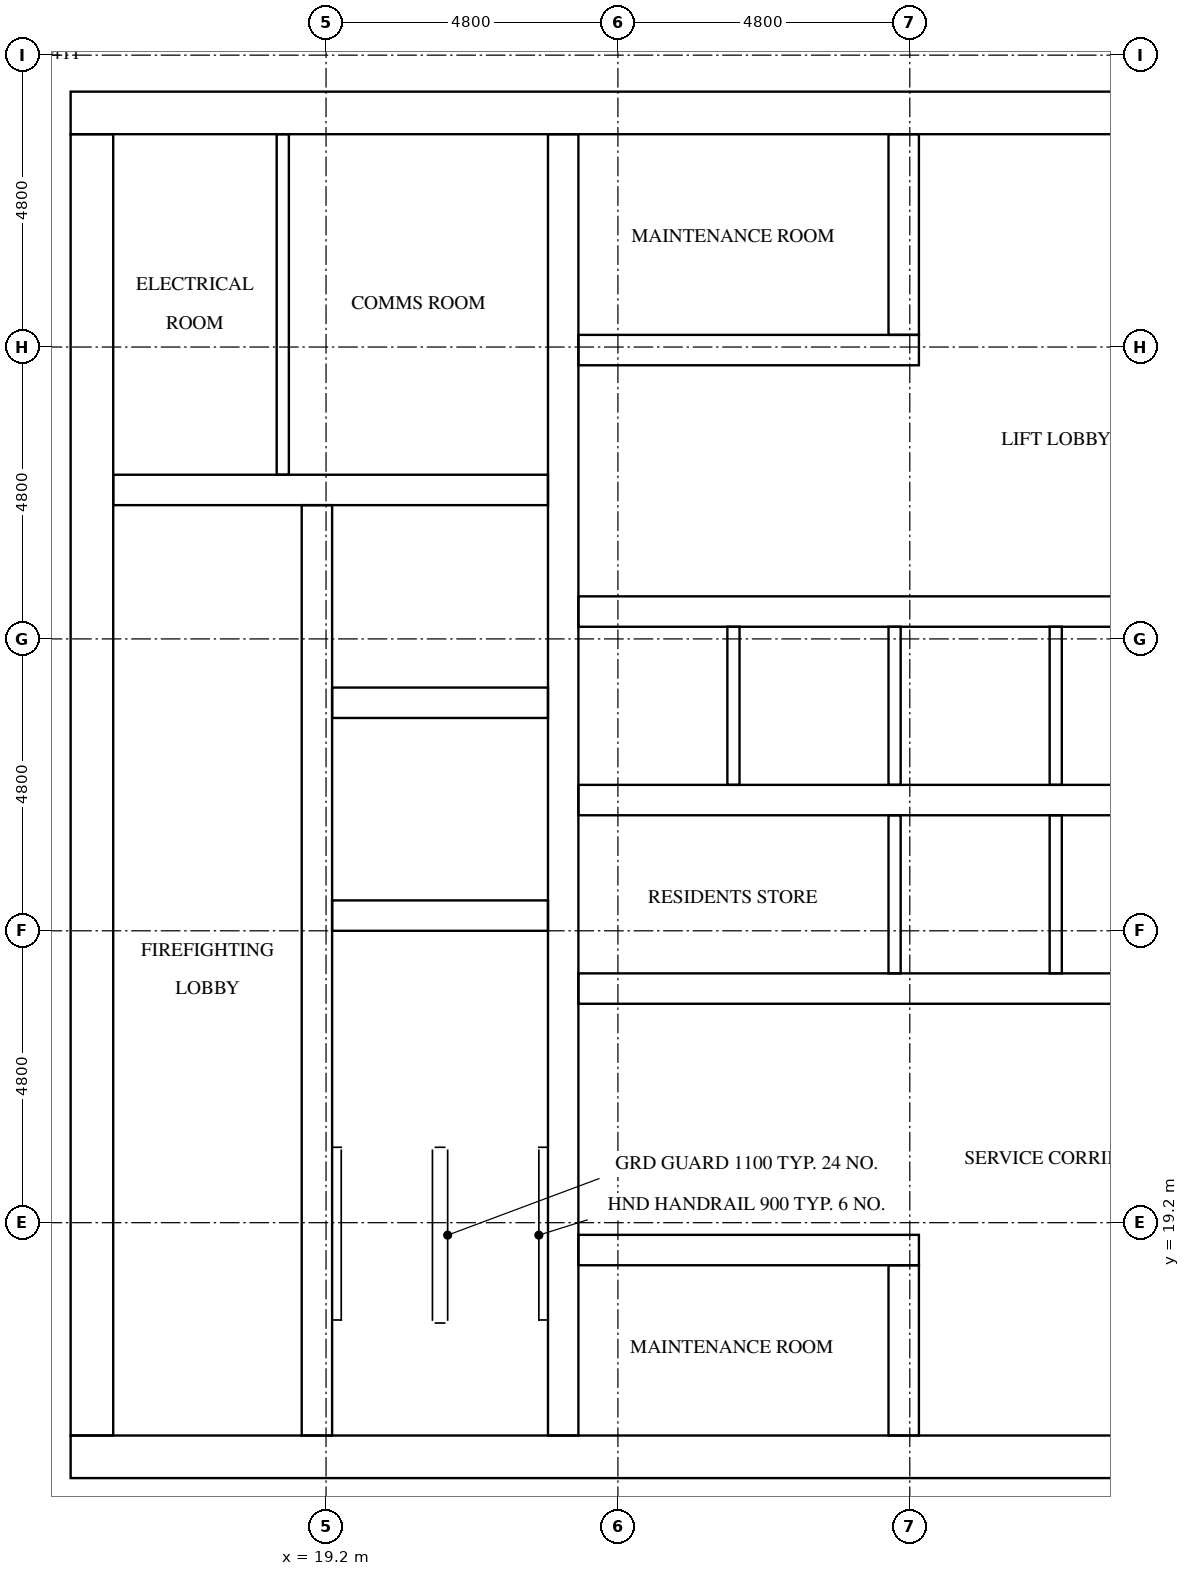
"""IFC4 building model, lengths in metres.
Left out: names, types, materials, properties, quantities, classifications, styles, units other than length and angle.
Written with IfcOpenShell. Run it as: python <this file> out.ifc"""

import sys

from ifc_helpers import new_model, si_unit, direction, frame, frame_2d, origin, place, context, subcontext, project, spatial, rectangle, extrude, element, fill, save


model = new_model("IFC4")
c1 = context("Model", 3, precision=1e-05, world=origin(), true_north=direction((0.0, 1.0)))
c2 = subcontext(c1, "Body", "Model", "MODEL_VIEW")
j1 = project(units=[si_unit("LENGTHUNIT", "METRE"), si_unit("PLANEANGLEUNIT", "RADIAN")], contexts=[c1])
p1 = place(None, origin())
s1 = spatial("IfcSite", under=j1, at=p1, CompositionType="ELEMENT")
p2 = place(p1, origin())
s2 = spatial("IfcBuilding", under=s1, at=p2, CompositionType="ELEMENT")
p3 = place(p2, frame((0.0, 0.0, 208.8)))
s3 = spatial("IfcBuildingStorey", under=s2, at=p3, CompositionType="ELEMENT", Elevation=208.8)
p4 = place(p3, frame((15.0, 15.35, 0.0), z_axis=(0.0, 0.0, 1.0), x_axis=(1.0, 0.0, 0.0)))
e1 = element("IfcWall", 1, at=p4, inside=s3, PredefinedType="SHEAR", context=c2, shape_type="SweptSolid", body=[
    extrude(rectangle(XDim=32.4, YDim=0.7, at=frame_2d((16.2, 0.0))), origin(), (0.0, 0.0, 1.0), 3.2),
])
p5 = place(p4, frame((15.3, 0.0, 0.0)))
e2 = element("IfcOpeningElement", 2, at=p5, cuts=e1, PredefinedType="OPENING", context=c2, shape_type="SweptSolid", body=[
    extrude(rectangle(XDim=1.8, YDim=2.1, at=frame_2d((0.9, 1.05))), frame((0.0, 0.36, 0.0), z_axis=(0.0, -1.0, 0.0), x_axis=(1.0, 0.0, 0.0)), (0.0, 0.0, 1.0), 0.72),
])
p6 = place(p3, frame((15.0, 37.45, 0.0), z_axis=(0.0, 0.0, 1.0), x_axis=(1.0, 0.0, 0.0)))
e3 = element("IfcWall", 3, at=p6, inside=s3, PredefinedType="SHEAR", context=c2, shape_type="SweptSolid", body=[
    extrude(rectangle(XDim=32.4, YDim=0.7, at=frame_2d((16.2, 0.0))), origin(), (0.0, 0.0, 1.0), 3.2),
])
p7 = place(p6, frame((15.3, 0.0, 0.0)))
e4 = element("IfcOpeningElement", 4, at=p7, cuts=e3, PredefinedType="OPENING", context=c2, shape_type="SweptSolid", body=[
    extrude(rectangle(XDim=1.8, YDim=2.1, at=frame_2d((0.9, 1.05))), frame((0.0, 0.36, 0.0), z_axis=(0.0, -1.0, 0.0), x_axis=(1.0, 0.0, 0.0)), (0.0, 0.0, 1.0), 0.72),
])
p8 = place(p6, frame((1.544, 0.0, 0.0)))
e5 = element("IfcOpeningElement", 5, at=p8, cuts=e3, PredefinedType="OPENING", context=c2, shape_type="SweptSolid", body=[
    extrude(rectangle(XDim=1.0, YDim=2.1, at=frame_2d((0.5, 1.05))), frame((0.0, 0.36, 0.0), z_axis=(0.0, -1.0, 0.0), x_axis=(1.0, 0.0, 0.0)), (0.0, 0.0, 1.0), 0.72),
])
p9 = place(p6, frame((5.219, 0.0, 0.0)))
e6 = element("IfcOpeningElement", 6, at=p9, cuts=e3, PredefinedType="OPENING", context=c2, shape_type="SweptSolid", body=[
    extrude(rectangle(XDim=1.0, YDim=2.1, at=frame_2d((0.5, 1.05))), frame((0.0, 0.36, 0.0), z_axis=(0.0, -1.0, 0.0), x_axis=(1.0, 0.0, 0.0)), (0.0, 0.0, 1.0), 0.72),
])
p10 = place(p3, frame((15.35, 15.7, 0.0), z_axis=(0.0, 0.0, 1.0), x_axis=(0.0, 1.0, 0.0)))
e7 = element("IfcWall", 7, at=p10, inside=s3, PredefinedType="SHEAR", context=c2, shape_type="SweptSolid", body=[
    extrude(rectangle(XDim=21.4, YDim=0.7, at=frame_2d((10.7, 0.0))), origin(), (0.0, 0.0, 1.0), 3.2),
])
p11 = place(p10, frame((5.06, 0.0, 0.0)))
e8 = element("IfcOpeningElement", 8, at=p11, cuts=e7, PredefinedType="OPENING", context=c2, shape_type="SweptSolid", body=[
    extrude(rectangle(XDim=1.2, YDim=2.1, at=frame_2d((0.6, 1.05))), frame((0.0, 0.36, 0.0), z_axis=(0.0, -1.0, 0.0), x_axis=(1.0, 0.0, 0.0)), (0.0, 0.0, 1.0), 0.72),
])
p12 = place(p3, frame((19.05, 15.7, 0.0), z_axis=(0.0, 0.0, 1.0), x_axis=(0.0, 1.0, 0.0)))
e9 = element("IfcWall", 9, at=p12, inside=s3, PredefinedType="SHEAR", context=c2, shape_type="SweptSolid", body=[
    extrude(rectangle(XDim=15.3, YDim=0.5, at=frame_2d((7.65, 0.0))), origin(), (0.0, 0.0, 1.0), 3.2),
])
p13 = place(p12, frame((9.75, 0.0, 0.0)))
e10 = element("IfcOpeningElement", 10, at=p13, cuts=e9, PredefinedType="OPENING", context=c2, shape_type="SweptSolid", body=[
    extrude(rectangle(XDim=1.1, YDim=2.1, at=frame_2d((0.55, 1.05))), frame((0.0, 0.26, 0.0), z_axis=(0.0, -1.0, 0.0), x_axis=(1.0, 0.0, 0.0)), (0.0, 0.0, 1.0), 0.52),
])
p14 = place(p12, frame((13.25, 0.0, 0.0)))
e11 = element("IfcOpeningElement", 11, at=p14, cuts=e9, PredefinedType="OPENING", context=c2, shape_type="SweptSolid", body=[
    extrude(rectangle(XDim=1.1, YDim=2.1, at=frame_2d((0.55, 1.05))), frame((0.0, 0.26, 0.0), z_axis=(0.0, -1.0, 0.0), x_axis=(1.0, 0.0, 0.0)), (0.0, 0.0, 1.0), 0.52),
])
p15 = place(p12, frame((0.5, 0.0, 0.0)))
e12 = element("IfcOpeningElement", 12, at=p15, cuts=e9, PredefinedType="OPENING", context=c2, shape_type="SweptSolid", body=[
    extrude(rectangle(XDim=1.2, YDim=2.1, at=frame_2d((0.6, 1.05))), frame((0.0, 0.26, 0.0), z_axis=(0.0, -1.0, 0.0), x_axis=(1.0, 0.0, 0.0)), (0.0, 0.0, 1.0), 0.52),
])
p16 = place(p3, frame((23.1, 15.7, 0.0), z_axis=(0.0, 0.0, 1.0), x_axis=(0.0, 1.0, 0.0)))
e13 = element("IfcWall", 13, at=p16, inside=s3, PredefinedType="SHEAR", context=c2, shape_type="SweptSolid", body=[
    extrude(rectangle(XDim=21.4, YDim=0.5, at=frame_2d((10.7, 0.0))), origin(), (0.0, 0.0, 1.0), 3.2),
])
for number, where, z_axis, x_axis in (
    (14, (19.3, 24.25, 0.0), (0.0, 0.0, 1.0), (1.0, 0.0, 0.0)),
    (15, (19.3, 27.75, 0.0), (0.0, 0.0, 1.0), (1.0, 0.0, 0.0)),
):
    element("IfcWall", number, at=place(p3, frame(where, z_axis=z_axis, x_axis=x_axis)), inside=s3, PredefinedType="SHEAR", context=c2, shape_type="SweptSolid", body=[
        extrude(rectangle(XDim=3.55, YDim=0.5, at=frame_2d((1.775, 0.0))), origin(), (0.0, 0.0, 1.0), 3.2),
    ])
p17 = place(p3, frame((15.7, 31.25, 0.0), z_axis=(0.0, 0.0, 1.0), x_axis=(1.0, 0.0, 0.0)))
e16 = element("IfcWall", 16, at=p17, inside=s3, PredefinedType="SHEAR", context=c2, shape_type="SweptSolid", body=[
    extrude(rectangle(XDim=7.15, YDim=0.5, at=frame_2d((3.575, 0.0))), origin(), (0.0, 0.0, 1.0), 3.2),
])
p18 = place(p3, frame((23.35, 18.75, 0.0), z_axis=(0.0, 0.0, 1.0), x_axis=(1.0, 0.0, 0.0)))
e17 = element("IfcWall", 17, at=p18, inside=s3, PredefinedType="SHEAR", context=c2, shape_type="SweptSolid", body=[
    extrude(rectangle(XDim=5.6, YDim=0.5, at=frame_2d((2.8, 0.0))), origin(), (0.0, 0.0, 1.0), 3.2),
])
p19 = place(p18, frame((2.05, 0.0, 0.0)))
e18 = element("IfcOpeningElement", 18, at=p19, cuts=e17, PredefinedType="OPENING", context=c2, shape_type="SweptSolid", body=[
    extrude(rectangle(XDim=1.0, YDim=2.1, at=frame_2d((0.5, 1.05))), frame((0.0, 0.26, 0.0), z_axis=(0.0, -1.0, 0.0), x_axis=(1.0, 0.0, 0.0)), (0.0, 0.0, 1.0), 0.52),
])
p20 = place(p3, frame((23.35, 23.05, 0.0), z_axis=(0.0, 0.0, 1.0), x_axis=(1.0, 0.0, 0.0)))
e19 = element("IfcWall", 19, at=p20, inside=s3, PredefinedType="SHEAR", context=c2, shape_type="SweptSolid", body=[
    extrude(rectangle(XDim=15.7, YDim=0.5, at=frame_2d((7.85, 0.0))), origin(), (0.0, 0.0, 1.0), 3.2),
])
p21 = place(p20, frame((2.05, 0.0, 0.0)))
e20 = element("IfcOpeningElement", 20, at=p21, cuts=e19, PredefinedType="OPENING", context=c2, shape_type="SweptSolid", body=[
    extrude(rectangle(XDim=1.0, YDim=2.1, at=frame_2d((0.5, 1.05))), frame((0.0, 0.26, 0.0), z_axis=(0.0, -1.0, 0.0), x_axis=(1.0, 0.0, 0.0)), (0.0, 0.0, 1.0), 0.52),
])
p22 = place(p20, frame((12.65, 0.0, 0.0)))
e21 = element("IfcOpeningElement", 21, at=p22, cuts=e19, PredefinedType="OPENING", context=c2, shape_type="SweptSolid", body=[
    extrude(rectangle(XDim=1.0, YDim=2.1, at=frame_2d((0.5, 1.05))), frame((0.0, 0.26, 0.0), z_axis=(0.0, -1.0, 0.0), x_axis=(1.0, 0.0, 0.0)), (0.0, 0.0, 1.0), 0.52),
])
p23 = place(p3, frame((23.35, 26.15, 0.0), z_axis=(0.0, 0.0, 1.0), x_axis=(1.0, 0.0, 0.0)))
e22 = element("IfcWall", 22, at=p23, inside=s3, PredefinedType="SHEAR", context=c2, shape_type="SweptSolid", body=[
    extrude(rectangle(XDim=15.7, YDim=0.5, at=frame_2d((7.85, 0.0))), origin(), (0.0, 0.0, 1.0), 3.2),
])
p24 = place(p3, frame((23.35, 29.25, 0.0), z_axis=(0.0, 0.0, 1.0), x_axis=(1.0, 0.0, 0.0)))
e23 = element("IfcWall", 23, at=p24, inside=s3, PredefinedType="SHEAR", context=c2, shape_type="SweptSolid", body=[
    extrude(rectangle(XDim=15.7, YDim=0.5, at=frame_2d((7.85, 0.0))), origin(), (0.0, 0.0, 1.0), 3.2),
])
p25 = place(p24, frame((0.675, 0.0, 0.0)))
e24 = element("IfcOpeningElement", 24, at=p25, cuts=e23, PredefinedType="OPENING", context=c2, shape_type="SweptSolid", body=[
    extrude(rectangle(XDim=1.1, YDim=2.1, at=frame_2d((0.55, 1.05))), frame((0.0, 0.26, 0.0), z_axis=(0.0, -1.0, 0.0), x_axis=(1.0, 0.0, 0.0)), (0.0, 0.0, 1.0), 0.52),
])
p26 = place(p24, frame((3.325, 0.0, 0.0)))
e25 = element("IfcOpeningElement", 25, at=p26, cuts=e23, PredefinedType="OPENING", context=c2, shape_type="SweptSolid", body=[
    extrude(rectangle(XDim=1.1, YDim=2.1, at=frame_2d((0.55, 1.05))), frame((0.0, 0.26, 0.0), z_axis=(0.0, -1.0, 0.0), x_axis=(1.0, 0.0, 0.0)), (0.0, 0.0, 1.0), 0.52),
])
p27 = place(p24, frame((5.975, 0.0, 0.0)))
e26 = element("IfcOpeningElement", 26, at=p27, cuts=e23, PredefinedType="OPENING", context=c2, shape_type="SweptSolid", body=[
    extrude(rectangle(XDim=1.1, YDim=2.1, at=frame_2d((0.55, 1.05))), frame((0.0, 0.26, 0.0), z_axis=(0.0, -1.0, 0.0), x_axis=(1.0, 0.0, 0.0)), (0.0, 0.0, 1.0), 0.52),
])
p28 = place(p24, frame((8.625, 0.0, 0.0)))
e27 = element("IfcOpeningElement", 27, at=p28, cuts=e23, PredefinedType="OPENING", context=c2, shape_type="SweptSolid", body=[
    extrude(rectangle(XDim=1.1, YDim=2.1, at=frame_2d((0.55, 1.05))), frame((0.0, 0.26, 0.0), z_axis=(0.0, -1.0, 0.0), x_axis=(1.0, 0.0, 0.0)), (0.0, 0.0, 1.0), 0.52),
])
p29 = place(p24, frame((11.275, 0.0, 0.0)))
e28 = element("IfcOpeningElement", 28, at=p29, cuts=e23, PredefinedType="OPENING", context=c2, shape_type="SweptSolid", body=[
    extrude(rectangle(XDim=1.1, YDim=2.1, at=frame_2d((0.55, 1.05))), frame((0.0, 0.26, 0.0), z_axis=(0.0, -1.0, 0.0), x_axis=(1.0, 0.0, 0.0)), (0.0, 0.0, 1.0), 0.52),
])
p30 = place(p24, frame((13.925, 0.0, 0.0)))
e29 = element("IfcOpeningElement", 29, at=p30, cuts=e23, PredefinedType="OPENING", context=c2, shape_type="SweptSolid", body=[
    extrude(rectangle(XDim=1.1, YDim=2.1, at=frame_2d((0.55, 1.05))), frame((0.0, 0.26, 0.0), z_axis=(0.0, -1.0, 0.0), x_axis=(1.0, 0.0, 0.0)), (0.0, 0.0, 1.0), 0.52),
])
p31 = place(p3, frame((23.35, 33.55, 0.0), z_axis=(0.0, 0.0, 1.0), x_axis=(1.0, 0.0, 0.0)))
e30 = element("IfcWall", 30, at=p31, inside=s3, PredefinedType="SHEAR", context=c2, shape_type="SweptSolid", body=[
    extrude(rectangle(XDim=5.6, YDim=0.5, at=frame_2d((2.8, 0.0))), origin(), (0.0, 0.0, 1.0), 3.2),
])
p32 = place(p31, frame((2.05, 0.0, 0.0)))
e31 = element("IfcOpeningElement", 31, at=p32, cuts=e30, PredefinedType="OPENING", context=c2, shape_type="SweptSolid", body=[
    extrude(rectangle(XDim=1.0, YDim=2.1, at=frame_2d((0.5, 1.05))), frame((0.0, 0.26, 0.0), z_axis=(0.0, -1.0, 0.0), x_axis=(1.0, 0.0, 0.0)), (0.0, 0.0, 1.0), 0.52),
])
p33 = place(p3, frame((28.7, 15.7, 0.0), z_axis=(0.0, 0.0, 1.0), x_axis=(0.0, 1.0, 0.0)))
e32 = element("IfcWall", 32, at=p33, inside=s3, PredefinedType="SHEAR", context=c2, shape_type="SweptSolid", body=[
    extrude(rectangle(XDim=2.8, YDim=0.5, at=frame_2d((1.4, 0.0))), origin(), (0.0, 0.0, 1.0), 3.2),
])
p34 = place(p3, frame((28.7, 33.8, 0.0), z_axis=(0.0, 0.0, 1.0), x_axis=(0.0, 1.0, 0.0)))
e33 = element("IfcWall", 33, at=p34, inside=s3, PredefinedType="SHEAR", context=c2, shape_type="SweptSolid", body=[
    extrude(rectangle(XDim=3.3, YDim=0.5, at=frame_2d((1.65, 0.0))), origin(), (0.0, 0.0, 1.0), 3.2),
])
p35 = place(p3, frame((25.9, 26.4, 0.0), z_axis=(0.0, 0.0, 1.0), x_axis=(0.0, 1.0, 0.0)))
e34 = element("IfcWall", 34, at=p35, inside=s3, PredefinedType="SOLIDWALL", context=c2, shape_type="SweptSolid", body=[
    extrude(rectangle(XDim=2.6, YDim=0.2, at=frame_2d((1.3, 0.0))), origin(), (0.0, 0.0, 1.0), 3.2),
])
p36 = place(p3, frame((28.55, 23.3, 0.0), z_axis=(0.0, 0.0, 1.0), x_axis=(0.0, 1.0, 0.0)))
e35 = element("IfcWall", 35, at=p36, inside=s3, PredefinedType="SOLIDWALL", context=c2, shape_type="SweptSolid", body=[
    extrude(rectangle(XDim=2.6, YDim=0.2, at=frame_2d((1.3, 0.0))), origin(), (0.0, 0.0, 1.0), 3.2),
])
p37 = place(p3, frame((28.55, 26.4, 0.0), z_axis=(0.0, 0.0, 1.0), x_axis=(0.0, 1.0, 0.0)))
e36 = element("IfcWall", 36, at=p37, inside=s3, PredefinedType="SOLIDWALL", context=c2, shape_type="SweptSolid", body=[
    extrude(rectangle(XDim=2.6, YDim=0.2, at=frame_2d((1.3, 0.0))), origin(), (0.0, 0.0, 1.0), 3.2),
])
p38 = place(p3, frame((31.2, 23.3, 0.0), z_axis=(0.0, 0.0, 1.0), x_axis=(0.0, 1.0, 0.0)))
e37 = element("IfcWall", 37, at=p38, inside=s3, PredefinedType="SOLIDWALL", context=c2, shape_type="SweptSolid", body=[
    extrude(rectangle(XDim=2.6, YDim=0.2, at=frame_2d((1.3, 0.0))), origin(), (0.0, 0.0, 1.0), 3.2),
])
p39 = place(p3, frame((31.2, 26.4, 0.0), z_axis=(0.0, 0.0, 1.0), x_axis=(0.0, 1.0, 0.0)))
e38 = element("IfcWall", 38, at=p39, inside=s3, PredefinedType="SOLIDWALL", context=c2, shape_type="SweptSolid", body=[
    extrude(rectangle(XDim=2.6, YDim=0.2, at=frame_2d((1.3, 0.0))), origin(), (0.0, 0.0, 1.0), 3.2),
])
p40 = place(p3, frame((18.489, 31.5, 0.0), z_axis=(0.0, 0.0, 1.0), x_axis=(0.0, 1.0, 0.0)))
e39 = element("IfcWall", 39, at=p40, inside=s3, PredefinedType="PARTITIONING", context=c2, shape_type="SweptSolid", body=[
    extrude(rectangle(XDim=5.6, YDim=0.2, at=frame_2d((2.8, 0.0))), origin(), (0.0, 0.0, 1.0), 3.2),
])
p41 = place(p25, origin())
e40 = element("IfcDoor", 40, at=p41, inside=s3, OperationType="DOUBLE_DOOR_SLIDING", PredefinedType="DOOR", context=c2, shape_type="SweptSolid", body=[
    extrude(rectangle(XDim=1.1, YDim=2.1, at=frame_2d((0.55, 1.05))), frame((0.0, 0.025, 0.0), z_axis=(0.0, -1.0, 0.0), x_axis=(1.0, 0.0, 0.0)), (0.0, 0.0, 1.0), 0.05),
])
fill(e24, e40)
p42 = place(p26, origin())
e41 = element("IfcDoor", 41, at=p42, inside=s3, OperationType="DOUBLE_DOOR_SLIDING", PredefinedType="DOOR", context=c2, shape_type="SweptSolid", body=[
    extrude(rectangle(XDim=1.1, YDim=2.1, at=frame_2d((0.55, 1.05))), frame((0.0, 0.025, 0.0), z_axis=(0.0, -1.0, 0.0), x_axis=(1.0, 0.0, 0.0)), (0.0, 0.0, 1.0), 0.05),
])
fill(e25, e41)
p43 = place(p27, origin())
e42 = element("IfcDoor", 42, at=p43, inside=s3, OperationType="DOUBLE_DOOR_SLIDING", PredefinedType="DOOR", context=c2, shape_type="SweptSolid", body=[
    extrude(rectangle(XDim=1.1, YDim=2.1, at=frame_2d((0.55, 1.05))), frame((0.0, 0.025, 0.0), z_axis=(0.0, -1.0, 0.0), x_axis=(1.0, 0.0, 0.0)), (0.0, 0.0, 1.0), 0.05),
])
fill(e26, e42)
p44 = place(p28, origin())
e43 = element("IfcDoor", 43, at=p44, inside=s3, OperationType="DOUBLE_DOOR_SLIDING", PredefinedType="DOOR", context=c2, shape_type="SweptSolid", body=[
    extrude(rectangle(XDim=1.1, YDim=2.1, at=frame_2d((0.55, 1.05))), frame((0.0, 0.025, 0.0), z_axis=(0.0, -1.0, 0.0), x_axis=(1.0, 0.0, 0.0)), (0.0, 0.0, 1.0), 0.05),
])
fill(e27, e43)
p45 = place(p13, origin())
e44 = element("IfcDoor", 44, at=p45, inside=s3, OperationType="DOUBLE_DOOR_SLIDING", PredefinedType="DOOR", context=c2, shape_type="SweptSolid", body=[
    extrude(rectangle(XDim=1.1, YDim=2.1, at=frame_2d((0.55, 1.05))), frame((0.0, 0.025, 0.0), z_axis=(0.0, -1.0, 0.0), x_axis=(1.0, 0.0, 0.0)), (0.0, 0.0, 1.0), 0.05),
])
fill(e10, e44)
p46 = place(p14, origin())
e45 = element("IfcDoor", 45, at=p46, inside=s3, OperationType="DOUBLE_DOOR_SLIDING", PredefinedType="DOOR", context=c2, shape_type="SweptSolid", body=[
    extrude(rectangle(XDim=1.1, YDim=2.1, at=frame_2d((0.55, 1.05))), frame((0.0, 0.025, 0.0), z_axis=(0.0, -1.0, 0.0), x_axis=(1.0, 0.0, 0.0)), (0.0, 0.0, 1.0), 0.05),
])
fill(e11, e45)
p47 = place(p15, frame((1.2, 0.0, 0.0), z_axis=(0.0, 0.0, 1.0), x_axis=(-1.0, 0.0, 0.0)))
e46 = element("IfcDoor", 46, at=p47, inside=s3, OperationType="SINGLE_SWING_RIGHT", PredefinedType="DOOR", context=c2, shape_type="SweptSolid", body=[
    extrude(rectangle(XDim=1.2, YDim=2.1, at=frame_2d((0.6, 1.05))), frame((0.0, 0.025, 0.0), z_axis=(0.0, -1.0, 0.0), x_axis=(1.0, 0.0, 0.0)), (0.0, 0.0, 1.0), 0.05),
])
fill(e12, e46)
p48 = place(p5, frame((1.8, 0.0, 0.0), z_axis=(0.0, 0.0, 1.0), x_axis=(-1.0, 0.0, 0.0)))
e47 = element("IfcDoor", 47, at=p48, inside=s3, OperationType="DOUBLE_DOOR_SINGLE_SWING", PredefinedType="DOOR", context=c2, shape_type="SweptSolid", body=[
    extrude(rectangle(XDim=1.8, YDim=2.1, at=frame_2d((0.9, 1.05))), frame((0.0, 0.025, 0.0), z_axis=(0.0, -1.0, 0.0), x_axis=(1.0, 0.0, 0.0)), (0.0, 0.0, 1.0), 0.05),
])
fill(e2, e47)
p49 = place(p7, origin())
e48 = element("IfcDoor", 48, at=p49, inside=s3, OperationType="DOUBLE_DOOR_SINGLE_SWING", PredefinedType="DOOR", context=c2, shape_type="SweptSolid", body=[
    extrude(rectangle(XDim=1.8, YDim=2.1, at=frame_2d((0.9, 1.05))), frame((0.0, 0.025, 0.0), z_axis=(0.0, -1.0, 0.0), x_axis=(1.0, 0.0, 0.0)), (0.0, 0.0, 1.0), 0.05),
])
fill(e4, e48)
p50 = place(p11, frame((1.2, 0.0, 0.0), z_axis=(0.0, 0.0, 1.0), x_axis=(-1.0, 0.0, 0.0)))
e49 = element("IfcDoor", 49, at=p50, inside=s3, OperationType="SINGLE_SWING_LEFT", PredefinedType="DOOR", context=c2, shape_type="SweptSolid", body=[
    extrude(rectangle(XDim=1.2, YDim=2.1, at=frame_2d((0.6, 1.05))), frame((0.0, 0.025, 0.0), z_axis=(0.0, -1.0, 0.0), x_axis=(1.0, 0.0, 0.0)), (0.0, 0.0, 1.0), 0.05),
])
fill(e8, e49)
p51 = place(p8, origin())
e50 = element("IfcDoor", 50, at=p51, inside=s3, OperationType="SINGLE_SWING_LEFT", PredefinedType="DOOR", context=c2, shape_type="SweptSolid", body=[
    extrude(rectangle(XDim=1.0, YDim=2.1, at=frame_2d((0.5, 1.05))), frame((0.0, 0.025, 0.0), z_axis=(0.0, -1.0, 0.0), x_axis=(1.0, 0.0, 0.0)), (0.0, 0.0, 1.0), 0.05),
])
fill(e5, e50)
p52 = place(p9, origin())
e51 = element("IfcDoor", 51, at=p52, inside=s3, OperationType="SINGLE_SWING_RIGHT", PredefinedType="DOOR", context=c2, shape_type="SweptSolid", body=[
    extrude(rectangle(XDim=1.0, YDim=2.1, at=frame_2d((0.5, 1.05))), frame((0.0, 0.025, 0.0), z_axis=(0.0, -1.0, 0.0), x_axis=(1.0, 0.0, 0.0)), (0.0, 0.0, 1.0), 0.05),
])
fill(e6, e51)
p53 = place(p21, frame((1.0, 0.0, 0.0), z_axis=(0.0, 0.0, 1.0), x_axis=(-1.0, 0.0, 0.0)))
e52 = element("IfcDoor", 52, at=p53, inside=s3, OperationType="SINGLE_SWING_LEFT", PredefinedType="DOOR", context=c2, shape_type="SweptSolid", body=[
    extrude(rectangle(XDim=1.0, YDim=2.1, at=frame_2d((0.5, 1.05))), frame((0.0, 0.025, 0.0), z_axis=(0.0, -1.0, 0.0), x_axis=(1.0, 0.0, 0.0)), (0.0, 0.0, 1.0), 0.05),
])
fill(e20, e52)
p54 = place(p19, origin())
e53 = element("IfcDoor", 53, at=p54, inside=s3, OperationType="SINGLE_SWING_LEFT", PredefinedType="DOOR", context=c2, shape_type="SweptSolid", body=[
    extrude(rectangle(XDim=1.0, YDim=2.1, at=frame_2d((0.5, 1.05))), frame((0.0, 0.025, 0.0), z_axis=(0.0, -1.0, 0.0), x_axis=(1.0, 0.0, 0.0)), (0.0, 0.0, 1.0), 0.05),
])
fill(e18, e53)
p55 = place(p32, frame((1.0, 0.0, 0.0), z_axis=(0.0, 0.0, 1.0), x_axis=(-1.0, 0.0, 0.0)))
e54 = element("IfcDoor", 54, at=p55, inside=s3, OperationType="SINGLE_SWING_LEFT", PredefinedType="DOOR", context=c2, shape_type="SweptSolid", body=[
    extrude(rectangle(XDim=1.0, YDim=2.1, at=frame_2d((0.5, 1.05))), frame((0.0, 0.025, 0.0), z_axis=(0.0, -1.0, 0.0), x_axis=(1.0, 0.0, 0.0)), (0.0, 0.0, 1.0), 0.05),
])
fill(e31, e54)
save(model, sys.argv[1])
